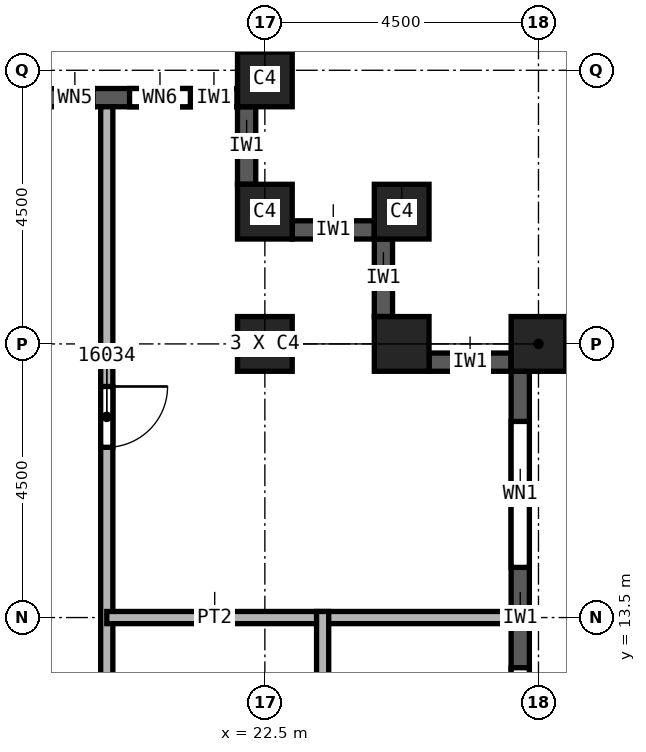
"""IFC4 building model, lengths in metres.
Left out: names, types, materials, properties, quantities, classifications, styles, units other than length and angle.
Written with IfcOpenShell. Run it as: python <this file> out.ifc"""

import sys

from ifc_helpers import new_model, si_unit, direction, frame, frame_2d, origin, origin_2d, place, context, subcontext, project, spatial, rectangle, extrude, element, fill, save


model = new_model("IFC4")
c1 = context("Model", 3, precision=1e-05, world=origin(), true_north=direction((0.0, 1.0)))
c2 = subcontext(c1, "Body", "Model", "MODEL_VIEW")
j1 = project(units=[si_unit("LENGTHUNIT", "METRE"), si_unit("PLANEANGLEUNIT", "RADIAN")], contexts=[c1])
p1 = place(None, origin())
s1 = spatial("IfcSite", under=j1, at=p1, CompositionType="ELEMENT")
p2 = place(p1, origin())
s2 = spatial("IfcBuilding", under=s1, at=p2, CompositionType="ELEMENT")
p3 = place(p2, frame((0.0, 0.0, 242.0)))
s3 = spatial("IfcBuildingStorey", under=s2, at=p3, CompositionType="ELEMENT", Elevation=242.0)
for number, where, z_axis, x_axis in (
    (1, (22.5, 18.0, 0.0), (0.0, 0.0, 1.0), (1.0, 0.0, 0.0)),
    (2, (27.0, 18.0, 0.0), (0.0, 0.0, 1.0), (0.0, 1.0, 0.0)),
    (3, (22.5, 22.35, 0.0), (0.0, 0.0, 1.0), (1.0, 0.0, 0.0)),
    (4, (22.5, 20.175, 0.0), (0.0, 0.0, 1.0), (1.0, 0.0, 0.0)),
    (5, (24.75, 20.175, 0.0), (0.0, 0.0, 1.0), (1.0, 0.0, 0.0)),
    (6, (24.75, 18.0, 0.0), (0.0, 0.0, 1.0), (1.0, 0.0, 0.0)),
):
    element("IfcColumn", number, at=place(p3, frame(where, z_axis=z_axis, x_axis=x_axis)), inside=s3, PredefinedType="COLUMN", context=c2, shape_type="SweptSolid", body=[
        extrude(rectangle(XDim=0.9, YDim=0.9, at=origin_2d()), origin(), (0.0, 0.0, 1.0), 3.72),
    ])
p4 = place(p3, frame((26.7, 9.45, 0.0), z_axis=(0.0, 0.0, 1.0), x_axis=(0.0, 1.0, 0.0)))
e7 = element("IfcWall", 7, at=p4, inside=s3, PredefinedType="SOLIDWALL", context=c2, shape_type="SweptSolid", body=[
    extrude(rectangle(XDim=8.1, YDim=0.3, at=frame_2d((4.05, 0.0))), origin(), (0.0, 0.0, 1.0), 3.12),
])
p5 = place(p4, frame((0.825, 0.0, 0.8)))
e8 = element("IfcOpeningElement", 8, at=p5, cuts=e7, PredefinedType="OPENING", context=c2, shape_type="SweptSolid", body=[
    extrude(rectangle(XDim=2.4, YDim=1.95, at=frame_2d((1.2, 0.975))), frame((0.0, 0.15, 0.0), z_axis=(0.0, -1.0, 0.0), x_axis=(1.0, 0.0, 0.0)), (0.0, 0.0, 1.0), 0.3),
])
p6 = place(p4, frame((4.875, 0.0, 0.8)))
e9 = element("IfcOpeningElement", 9, at=p6, cuts=e7, PredefinedType="OPENING", context=c2, shape_type="SweptSolid", body=[
    extrude(rectangle(XDim=2.4, YDim=1.95, at=frame_2d((1.2, 0.975))), frame((0.0, 0.15, 0.0), z_axis=(0.0, -1.0, 0.0), x_axis=(1.0, 0.0, 0.0)), (0.0, 0.0, 1.0), 0.3),
])
p7 = place(p3, frame((26.55, 17.7, 0.0), z_axis=(0.0, 0.0, 1.0), x_axis=(-1.0, 0.0, 0.0)))
e10 = element("IfcWall", 10, at=p7, inside=s3, PredefinedType="SOLIDWALL", context=c2, shape_type="SweptSolid", body=[
    extrude(rectangle(XDim=1.35, YDim=0.3, at=frame_2d((0.675, 0.0))), origin(), (0.0, 0.0, 1.0), 3.12),
])
p8 = place(p3, frame((24.45, 18.45, 0.0), z_axis=(0.0, 0.0, 1.0), x_axis=(0.0, 1.0, 0.0)))
e11 = element("IfcWall", 11, at=p8, inside=s3, PredefinedType="SOLIDWALL", context=c2, shape_type="SweptSolid", body=[
    extrude(rectangle(XDim=1.275, YDim=0.3, at=frame_2d((0.638, 0.0))), origin(), (0.0, 0.0, 1.0), 3.12),
])
p9 = place(p3, frame((24.3, 19.875, 0.0), z_axis=(0.0, 0.0, 1.0), x_axis=(-1.0, 0.0, 0.0)))
e12 = element("IfcWall", 12, at=p9, inside=s3, PredefinedType="SOLIDWALL", context=c2, shape_type="SweptSolid", body=[
    extrude(rectangle(XDim=1.35, YDim=0.3, at=frame_2d((0.675, 0.0))), origin(), (0.0, 0.0, 1.0), 3.12),
])
p10 = place(p3, frame((22.2, 20.625, 0.0), z_axis=(0.0, 0.0, 1.0), x_axis=(0.0, 1.0, 0.0)))
e13 = element("IfcWall", 13, at=p10, inside=s3, PredefinedType="SOLIDWALL", context=c2, shape_type="SweptSolid", body=[
    extrude(rectangle(XDim=1.275, YDim=0.3, at=frame_2d((0.637, 0.0))), origin(), (0.0, 0.0, 1.0), 3.12),
])
p11 = place(p3, frame((22.05, 22.05, 0.0), z_axis=(0.0, 0.0, 1.0), x_axis=(-1.0, 0.0, 0.0)))
e14 = element("IfcWall", 14, at=p11, inside=s3, PredefinedType="SOLIDWALL", context=c2, shape_type="SweptSolid", body=[
    extrude(rectangle(XDim=3.6, YDim=0.3, at=frame_2d((1.8, 0.0))), origin(), (0.0, 0.0, 1.0), 3.12),
])
p12 = place(p11, frame((0.775, 0.0, 0.8)))
e15 = element("IfcOpeningElement", 15, at=p12, cuts=e14, PredefinedType="OPENING", context=c2, shape_type="SweptSolid", body=[
    extrude(rectangle(XDim=1.0, YDim=1.95, at=frame_2d((0.5, 0.975))), frame((0.0, 0.15, 0.0), z_axis=(0.0, -1.0, 0.0), x_axis=(1.0, 0.0, 0.0)), (0.0, 0.0, 1.0), 0.3),
])
p13 = place(p11, frame((2.375, 0.0, 0.8)))
e16 = element("IfcOpeningElement", 16, at=p13, cuts=e14, PredefinedType="OPENING", context=c2, shape_type="SweptSolid", body=[
    extrude(rectangle(XDim=0.6, YDim=1.95, at=frame_2d((0.3, 0.975))), frame((0.0, 0.15, 0.0), z_axis=(0.0, -1.0, 0.0), x_axis=(1.0, 0.0, 0.0)), (0.0, 0.0, 1.0), 0.3),
])
p14 = place(p3, frame((19.9, 21.9, 0.0), z_axis=(0.0, 0.0, 1.0), x_axis=(0.0, -1.0, 0.0)))
e17 = element("IfcWall", 17, at=p14, inside=s3, PredefinedType="PARTITIONING", context=c2, shape_type="SweptSolid", body=[
    extrude(rectangle(XDim=43.8, YDim=0.2, at=frame_2d((21.9, 0.0))), origin(), (0.0, 0.0, 1.0), 3.72),
])
p15 = place(p14, frame((17.4, 0.0, 0.0)))
e18 = element("IfcOpeningElement", 18, at=p15, cuts=e17, PredefinedType="OPENING", context=c2, shape_type="SweptSolid", body=[
    extrude(rectangle(XDim=1.0, YDim=2.1, at=frame_2d((0.5, 1.05))), frame((0.0, 0.1, 0.0), z_axis=(0.0, -1.0, 0.0), x_axis=(1.0, 0.0, 0.0)), (0.0, 0.0, 1.0), 0.2),
])
p16 = place(p14, frame((4.6, 0.0, 0.0)))
e19 = element("IfcOpeningElement", 19, at=p16, cuts=e17, PredefinedType="OPENING", context=c2, shape_type="SweptSolid", body=[
    extrude(rectangle(XDim=1.0, YDim=2.1, at=frame_2d((0.5, 1.05))), frame((0.0, 0.1, 0.0), z_axis=(0.0, -1.0, 0.0), x_axis=(1.0, 0.0, 0.0)), (0.0, 0.0, 1.0), 0.2),
])
p17 = place(p14, frame((39.0, 0.0, 0.0)))
e20 = element("IfcOpeningElement", 20, at=p17, cuts=e17, PredefinedType="OPENING", context=c2, shape_type="SweptSolid", body=[
    extrude(rectangle(XDim=1.0, YDim=2.1, at=frame_2d((0.5, 1.05))), frame((0.0, 0.1, 0.0), z_axis=(0.0, -1.0, 0.0), x_axis=(1.0, 0.0, 0.0)), (0.0, 0.0, 1.0), 0.2),
])
p18 = place(p14, frame((30.6, 0.0, 0.0)))
e21 = element("IfcOpeningElement", 21, at=p18, cuts=e17, PredefinedType="OPENING", context=c2, shape_type="SweptSolid", body=[
    extrude(rectangle(XDim=1.0, YDim=2.1, at=frame_2d((0.5, 1.05))), frame((0.0, 0.1, 0.0), z_axis=(0.0, -1.0, 0.0), x_axis=(1.0, 0.0, 0.0)), (0.0, 0.0, 1.0), 0.2),
])
p19 = place(p14, frame((22.95, 0.0, 0.0)))
e22 = element("IfcOpeningElement", 22, at=p19, cuts=e17, PredefinedType="OPENING", context=c2, shape_type="SweptSolid", body=[
    extrude(rectangle(XDim=1.0, YDim=2.1, at=frame_2d((0.5, 1.05))), frame((0.0, 0.1, 0.0), z_axis=(0.0, -1.0, 0.0), x_axis=(1.0, 0.0, 0.0)), (0.0, 0.0, 1.0), 0.2),
])
p20 = place(p3, frame((19.9, 13.5, 0.0), z_axis=(0.0, 0.0, 1.0), x_axis=(1.0, 0.0, 0.0)))
e23 = element("IfcWall", 23, at=p20, inside=s3, PredefinedType="PARTITIONING", context=c2, shape_type="SweptSolid", body=[
    extrude(rectangle(XDim=6.65, YDim=0.2, at=frame_2d((3.325, 0.0))), origin(), (0.0, 0.0, 1.0), 3.72),
])
p21 = place(p3, frame((23.45, 13.6, 0.0), z_axis=(0.0, 0.0, 1.0), x_axis=(0.0, -1.0, 0.0)))
e24 = element("IfcWall", 24, at=p21, inside=s3, PredefinedType="PARTITIONING", context=c2, shape_type="SweptSolid", body=[
    extrude(rectangle(XDim=13.7, YDim=0.2, at=frame_2d((6.85, 0.0))), origin(), (0.0, 0.0, 1.0), 3.72),
])
p22 = place(p21, frame((8.2, 0.0, 0.0)))
e25 = element("IfcOpeningElement", 25, at=p22, cuts=e24, PredefinedType="OPENING", context=c2, shape_type="SweptSolid", body=[
    extrude(rectangle(XDim=1.0, YDim=2.1, at=frame_2d((0.5, 1.05))), frame((0.0, 0.1, 0.0), z_axis=(0.0, -1.0, 0.0), x_axis=(1.0, 0.0, 0.0)), (0.0, 0.0, 1.0), 0.2),
])
p23 = place(p5, origin())
e26 = element("IfcWindow", 26, at=p23, inside=s3, PartitioningType="SINGLE_PANEL", PredefinedType="WINDOW", context=c2, shape_type="SweptSolid", body=[
    extrude(rectangle(XDim=2.4, YDim=1.95, at=frame_2d((1.2, 0.975))), frame((0.0, 0.03, 0.0), z_axis=(0.0, -1.0, 0.0), x_axis=(1.0, 0.0, 0.0)), (0.0, 0.0, 1.0), 0.06),
])
fill(e8, e26)
p24 = place(p6, origin())
e27 = element("IfcWindow", 27, at=p24, inside=s3, PartitioningType="SINGLE_PANEL", PredefinedType="WINDOW", context=c2, shape_type="SweptSolid", body=[
    extrude(rectangle(XDim=2.4, YDim=1.95, at=frame_2d((1.2, 0.975))), frame((0.0, 0.03, 0.0), z_axis=(0.0, -1.0, 0.0), x_axis=(1.0, 0.0, 0.0)), (0.0, 0.0, 1.0), 0.06),
])
fill(e9, e27)
p25 = place(p16, origin())
e28 = element("IfcDoor", 28, at=p25, inside=s3, OperationType="SINGLE_SWING_LEFT", PredefinedType="DOOR", context=c2, shape_type="SweptSolid", body=[
    extrude(rectangle(XDim=1.0, YDim=2.1, at=frame_2d((0.5, 1.05))), frame((0.0, 0.025, 0.0), z_axis=(0.0, -1.0, 0.0), x_axis=(1.0, 0.0, 0.0)), (0.0, 0.0, 1.0), 0.05),
])
fill(e19, e28)
p26 = place(p12, origin())
e29 = element("IfcWindow", 29, at=p26, inside=s3, PartitioningType="SINGLE_PANEL", PredefinedType="WINDOW", context=c2, shape_type="SweptSolid", body=[
    extrude(rectangle(XDim=1.0, YDim=1.95, at=frame_2d((0.5, 0.975))), frame((0.0, 0.03, 0.0), z_axis=(0.0, -1.0, 0.0), x_axis=(1.0, 0.0, 0.0)), (0.0, 0.0, 1.0), 0.06),
])
fill(e15, e29)
p27 = place(p13, origin())
e30 = element("IfcWindow", 30, at=p27, inside=s3, PartitioningType="SINGLE_PANEL", PredefinedType="WINDOW", context=c2, shape_type="SweptSolid", body=[
    extrude(rectangle(XDim=0.6, YDim=1.95, at=frame_2d((0.3, 0.975))), frame((0.0, 0.03, 0.0), z_axis=(0.0, -1.0, 0.0), x_axis=(1.0, 0.0, 0.0)), (0.0, 0.0, 1.0), 0.06),
])
fill(e16, e30)
save(model, sys.argv[1])
